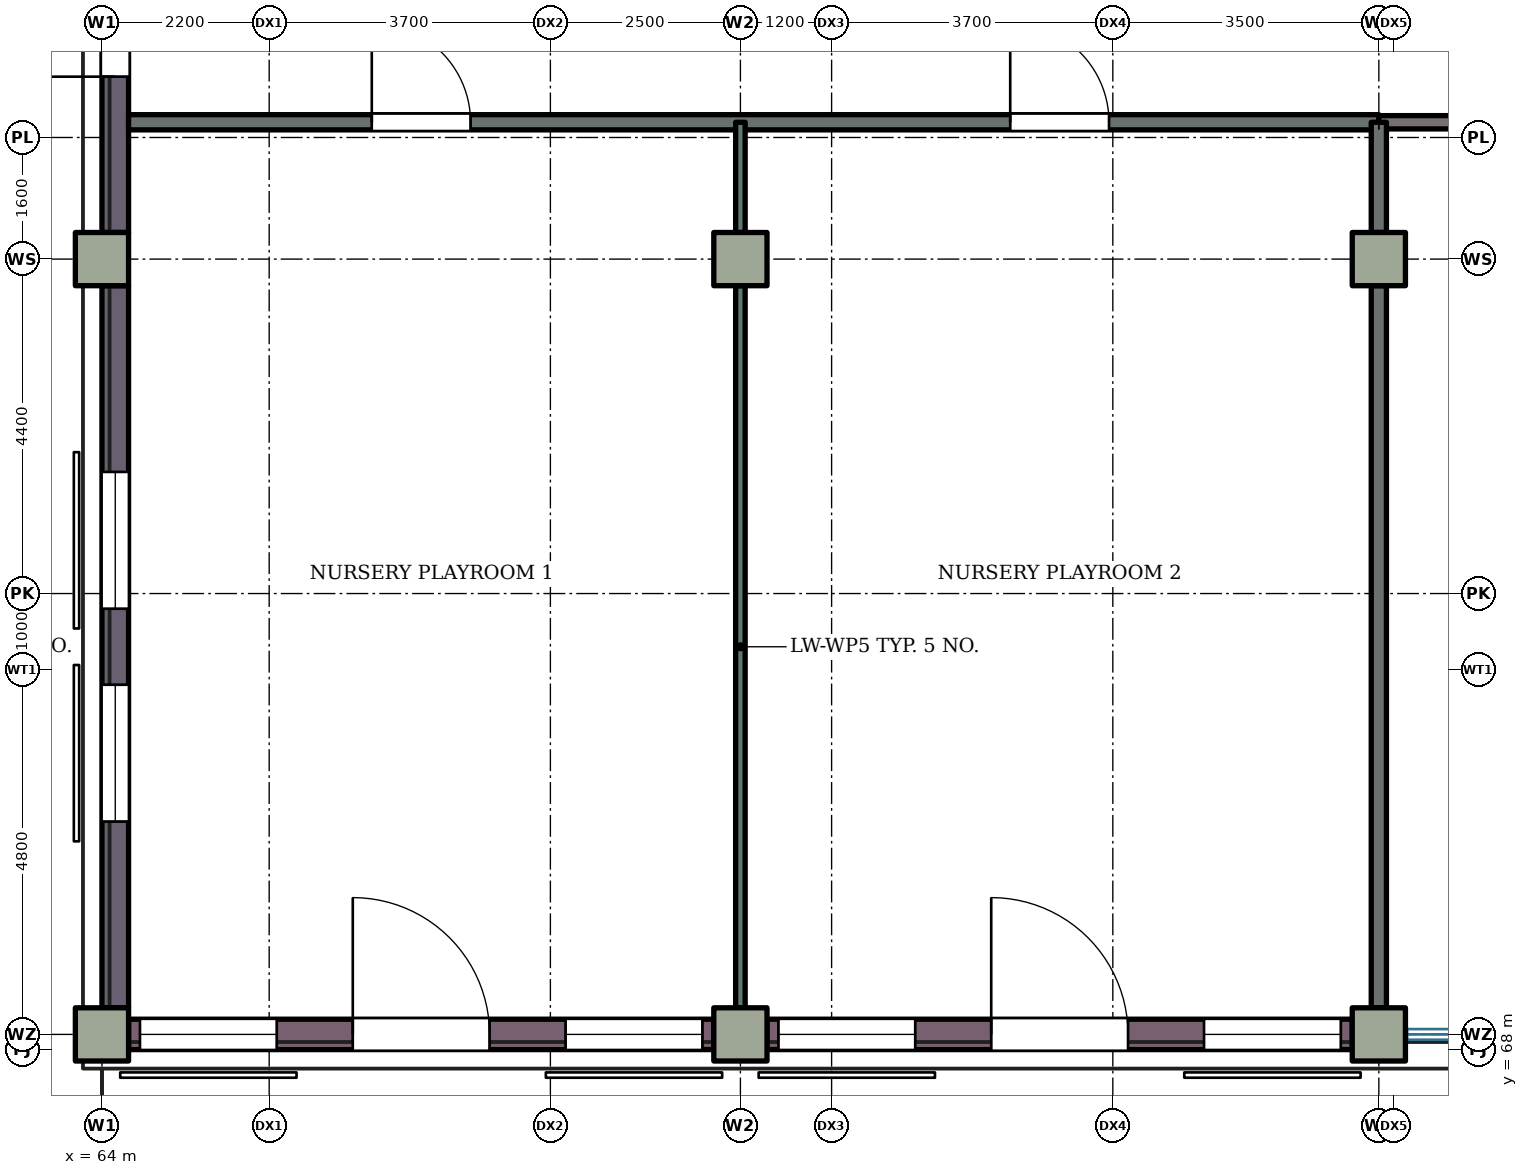
"""IFC4 building model, lengths in metres.
Left out: names, types, materials, properties, quantities, classifications, styles, units other than length and angle.
Written with IfcOpenShell. Run it as: python <this file> out.ifc"""

import sys

from ifc_helpers import new_model, si_unit, direction, frame, frame_2d, origin, origin_2d, place, context, subcontext, project, spatial, rectangle, extrude, element, fill, save


model = new_model("IFC4")
c1 = context("Model", 3, precision=1e-05, world=origin(), true_north=direction((0.0, 1.0)))
c2 = subcontext(c1, "Body", "Model", "MODEL_VIEW")
j1 = project(units=[si_unit("LENGTHUNIT", "METRE"), si_unit("PLANEANGLEUNIT", "RADIAN")], contexts=[c1])
p1 = place(None, origin())
s1 = spatial("IfcSite", under=j1, at=p1, CompositionType="ELEMENT")
p2 = place(p1, origin())
s2 = spatial("IfcBuilding", under=s1, at=p2, CompositionType="ELEMENT")
p3 = place(p2, origin())
s3 = spatial("IfcBuildingStorey", under=s2, at=p3, CompositionType="ELEMENT", Elevation=0.0)
for number, where, z_axis, x_axis in (
    (1, (64.0, 78.4, 0.0), (0.0, 0.0, 1.0), (1.0, 0.0, 0.0)),
    (2, (72.4, 78.4, 0.0), (0.0, 0.0, 1.0), (1.0, 0.0, 0.0)),
    (3, (80.8, 78.4, 0.0), (0.0, 0.0, 1.0), (1.0, 0.0, 0.0)),
    (4, (64.0, 68.2, 0.0), (0.0, 0.0, 1.0), (1.0, 0.0, 0.0)),
    (5, (72.4, 68.2, 0.0), (0.0, 0.0, 1.0), (1.0, 0.0, 0.0)),
    (6, (80.8, 68.2, 0.0), (0.0, 0.0, 1.0), (1.0, 0.0, 0.0)),
):
    element("IfcColumn", number, at=place(p3, frame(where, z_axis=z_axis, x_axis=x_axis)), inside=s3, PredefinedType="COLUMN", context=c2, shape_type="SweptSolid", body=[
        extrude(rectangle(XDim=0.7, YDim=0.7, at=origin_2d()), origin(), (0.0, 0.0, 1.0), 4.2),
    ])
p4 = place(p3, frame((64.175, 68.55, 0.0), z_axis=(0.0, 0.0, 1.0), x_axis=(0.0, 1.0, 0.0)))
e7 = element("IfcWall", 7, at=p4, inside=s3, PredefinedType="SHEAR", context=c2, shape_type="SweptSolid", body=[
    extrude(rectangle(XDim=9.5, YDim=0.35, at=frame_2d((4.75, 0.0))), origin(), (0.0, 0.0, 1.0), 4.2),
])
p5 = place(p4, frame((2.45, 0.0, 0.9)))
e8 = element("IfcOpeningElement", 8, at=p5, cuts=e7, PredefinedType="OPENING", context=c2, shape_type="SweptSolid", body=[
    extrude(rectangle(XDim=1.8, YDim=2.1, at=frame_2d((0.9, 1.05))), frame((0.0, 0.185, 0.0), z_axis=(0.0, -1.0, 0.0), x_axis=(1.0, 0.0, 0.0)), (0.0, 0.0, 1.0), 0.37),
])
p6 = place(p4, frame((5.25, 0.0, 0.9)))
e9 = element("IfcOpeningElement", 9, at=p6, cuts=e7, PredefinedType="OPENING", context=c2, shape_type="SweptSolid", body=[
    extrude(rectangle(XDim=1.8, YDim=2.1, at=frame_2d((0.9, 1.05))), frame((0.0, 0.185, 0.0), z_axis=(0.0, -1.0, 0.0), x_axis=(1.0, 0.0, 0.0)), (0.0, 0.0, 1.0), 0.37),
])
p7 = place(p3, frame((64.175, 78.75, 0.0), z_axis=(0.0, 0.0, 1.0), x_axis=(0.0, 1.0, 0.0)))
e10 = element("IfcWall", 10, at=p7, inside=s3, PredefinedType="SHEAR", context=c2, shape_type="SweptSolid", body=[
    extrude(rectangle(XDim=8.5, YDim=0.35, at=frame_2d((4.25, 0.0))), origin(), (0.0, 0.0, 1.0), 4.2),
])
p8 = place(p7, frame((2.05, 0.0, 0.0)))
e11 = element("IfcOpeningElement", 11, at=p8, cuts=e10, PredefinedType="OPENING", context=c2, shape_type="SweptSolid", body=[
    extrude(rectangle(XDim=1.8, YDim=2.1, at=frame_2d((0.9, 1.05))), frame((0.0, 0.185, 0.0), z_axis=(0.0, -1.0, 0.0), x_axis=(1.0, 0.0, 0.0)), (0.0, 0.0, 1.0), 0.37),
])
p9 = place(p7, frame((6.15, 0.0, 0.0)))
e12 = element("IfcOpeningElement", 12, at=p9, cuts=e10, PredefinedType="OPENING", context=c2, shape_type="SweptSolid", body=[
    extrude(rectangle(XDim=1.8, YDim=2.1, at=frame_2d((0.9, 1.05))), frame((0.0, 0.185, 0.0), z_axis=(0.0, -1.0, 0.0), x_axis=(1.0, 0.0, 0.0)), (0.0, 0.0, 1.0), 0.37),
])
p10 = place(p3, frame((64.35, 68.2, 0.0), z_axis=(0.0, 0.0, 1.0), x_axis=(1.0, 0.0, 0.0)))
e13 = element("IfcWall", 13, at=p10, inside=s3, PredefinedType="SOLIDWALL", context=c2, shape_type="SweptSolid", body=[
    extrude(rectangle(XDim=7.7, YDim=0.4, at=frame_2d((3.85, 0.0))), origin(), (0.0, 0.0, 1.0), 3.32),
])
p11 = place(p10, frame((2.95, 0.0, 0.0)))
e14 = element("IfcOpeningElement", 14, at=p11, cuts=e13, PredefinedType="OPENING", context=c2, shape_type="SweptSolid", body=[
    extrude(rectangle(XDim=1.8, YDim=2.4, at=frame_2d((0.9, 1.2))), frame((0.0, 0.21, 0.0), z_axis=(0.0, -1.0, 0.0), x_axis=(1.0, 0.0, 0.0)), (0.0, 0.0, 1.0), 0.42),
])
p12 = place(p10, frame((0.15, 0.0, 0.9)))
e15 = element("IfcOpeningElement", 15, at=p12, cuts=e13, PredefinedType="OPENING", context=c2, shape_type="SweptSolid", body=[
    extrude(rectangle(XDim=1.8, YDim=1.9, at=frame_2d((0.9, 0.95))), frame((0.0, 0.21, 0.0), z_axis=(0.0, -1.0, 0.0), x_axis=(1.0, 0.0, 0.0)), (0.0, 0.0, 1.0), 0.42),
])
p13 = place(p10, frame((5.75, 0.0, 0.9)))
e16 = element("IfcOpeningElement", 16, at=p13, cuts=e13, PredefinedType="OPENING", context=c2, shape_type="SweptSolid", body=[
    extrude(rectangle(XDim=1.8, YDim=1.9, at=frame_2d((0.9, 0.95))), frame((0.0, 0.21, 0.0), z_axis=(0.0, -1.0, 0.0), x_axis=(1.0, 0.0, 0.0)), (0.0, 0.0, 1.0), 0.42),
])
p14 = place(p3, frame((72.75, 68.2, 0.0), z_axis=(0.0, 0.0, 1.0), x_axis=(1.0, 0.0, 0.0)))
e17 = element("IfcWall", 17, at=p14, inside=s3, PredefinedType="SOLIDWALL", context=c2, shape_type="SweptSolid", body=[
    extrude(rectangle(XDim=7.7, YDim=0.4, at=frame_2d((3.85, 0.0))), origin(), (0.0, 0.0, 1.0), 3.32),
])
p15 = place(p14, frame((2.95, 0.0, 0.0)))
e18 = element("IfcOpeningElement", 18, at=p15, cuts=e17, PredefinedType="OPENING", context=c2, shape_type="SweptSolid", body=[
    extrude(rectangle(XDim=1.8, YDim=2.4, at=frame_2d((0.9, 1.2))), frame((0.0, 0.21, 0.0), z_axis=(0.0, -1.0, 0.0), x_axis=(1.0, 0.0, 0.0)), (0.0, 0.0, 1.0), 0.42),
])
p16 = place(p14, frame((0.15, 0.0, 0.9)))
e19 = element("IfcOpeningElement", 19, at=p16, cuts=e17, PredefinedType="OPENING", context=c2, shape_type="SweptSolid", body=[
    extrude(rectangle(XDim=1.8, YDim=1.9, at=frame_2d((0.9, 0.95))), frame((0.0, 0.21, 0.0), z_axis=(0.0, -1.0, 0.0), x_axis=(1.0, 0.0, 0.0)), (0.0, 0.0, 1.0), 0.42),
])
p17 = place(p14, frame((5.75, 0.0, 0.9)))
e20 = element("IfcOpeningElement", 20, at=p17, cuts=e17, PredefinedType="OPENING", context=c2, shape_type="SweptSolid", body=[
    extrude(rectangle(XDim=1.8, YDim=1.9, at=frame_2d((0.9, 0.95))), frame((0.0, 0.21, 0.0), z_axis=(0.0, -1.0, 0.0), x_axis=(1.0, 0.0, 0.0)), (0.0, 0.0, 1.0), 0.42),
])
p18 = place(p3, frame((64.35, 80.2, 0.0), z_axis=(0.0, 0.0, 1.0), x_axis=(1.0, 0.0, 0.0)))
e21 = element("IfcWall", 21, at=p18, inside=s3, PredefinedType="PARTITIONING", context=c2, shape_type="SweptSolid", body=[
    extrude(rectangle(XDim=16.45, YDim=0.2, at=frame_2d((8.225, 0.0))), origin(), (0.0, 0.0, 1.0), 3.92),
])
p19 = place(p18, frame((3.2, 0.0, 0.0)))
e22 = element("IfcOpeningElement", 22, at=p19, cuts=e21, PredefinedType="OPENING", context=c2, shape_type="SweptSolid", body=[
    extrude(rectangle(XDim=1.3, YDim=2.1, at=frame_2d((0.65, 1.05))), frame((0.0, 0.11, 0.0), z_axis=(0.0, -1.0, 0.0), x_axis=(1.0, 0.0, 0.0)), (0.0, 0.0, 1.0), 0.22),
])
p20 = place(p18, frame((11.6, 0.0, 0.0)))
e23 = element("IfcOpeningElement", 23, at=p20, cuts=e21, PredefinedType="OPENING", context=c2, shape_type="SweptSolid", body=[
    extrude(rectangle(XDim=1.3, YDim=2.1, at=frame_2d((0.65, 1.05))), frame((0.0, 0.11, 0.0), z_axis=(0.0, -1.0, 0.0), x_axis=(1.0, 0.0, 0.0)), (0.0, 0.0, 1.0), 0.22),
])
p21 = place(p3, frame((80.8, 80.2, 0.0), z_axis=(0.0, 0.0, 1.0), x_axis=(1.0, 0.0, 0.0)))
e24 = element("IfcWall", 24, at=p21, inside=s3, PredefinedType="PARTITIONING", context=c2, shape_type="SweptSolid", body=[
    extrude(rectangle(XDim=25.2, YDim=0.175, at=frame_2d((12.6, 0.0))), origin(), (0.0, 0.0, 1.0), 3.92),
])
p22 = place(p21, frame((11.9, 0.0, 0.0)))
e25 = element("IfcOpeningElement", 25, at=p22, cuts=e24, PredefinedType="OPENING", context=c2, shape_type="SweptSolid", body=[
    extrude(rectangle(XDim=1.4, YDim=2.1, at=frame_2d((0.7, 1.05))), frame((0.0, 0.097, 0.0), z_axis=(0.0, -1.0, 0.0), x_axis=(1.0, 0.0, 0.0)), (0.0, 0.0, 1.0), 0.195),
])
p23 = place(p3, frame((72.4, 68.55, 0.0), z_axis=(0.0, 0.0, 1.0), x_axis=(0.0, 1.0, 0.0)))
e26 = element("IfcWall", 26, at=p23, inside=s3, PredefinedType="PARTITIONING", context=c2, shape_type="SweptSolid", body=[
    extrude(rectangle(XDim=9.5, YDim=0.125, at=frame_2d((4.75, 0.0))), origin(), (0.0, 0.0, 1.0), 3.02),
])
p24 = place(p3, frame((72.4, 78.75, 0.0), z_axis=(0.0, 0.0, 1.0), x_axis=(0.0, 1.0, 0.0)))
e27 = element("IfcWall", 27, at=p24, inside=s3, PredefinedType="PARTITIONING", context=c2, shape_type="SweptSolid", body=[
    extrude(rectangle(XDim=1.45, YDim=0.125, at=frame_2d((0.725, 0.0))), origin(), (0.0, 0.0, 1.0), 3.02),
])
p25 = place(p3, frame((80.8, 68.55, 0.0), z_axis=(0.0, 0.0, 1.0), x_axis=(0.0, 1.0, 0.0)))
e28 = element("IfcWall", 28, at=p25, inside=s3, PredefinedType="PARTITIONING", context=c2, shape_type="SweptSolid", body=[
    extrude(rectangle(XDim=9.5, YDim=0.2, at=frame_2d((4.75, 0.0))), origin(), (0.0, 0.0, 1.0), 3.02),
])
p26 = place(p3, frame((80.8, 78.75, 0.0), z_axis=(0.0, 0.0, 1.0), x_axis=(0.0, 1.0, 0.0)))
e29 = element("IfcWall", 29, at=p26, inside=s3, PredefinedType="PARTITIONING", context=c2, shape_type="SweptSolid", body=[
    extrude(rectangle(XDim=1.45, YDim=0.2, at=frame_2d((0.725, 0.0))), origin(), (0.0, 0.0, 1.0), 3.02),
])
p27 = place(p11, origin())
e30 = element("IfcDoor", 30, at=p27, inside=s3, OperationType="DOUBLE_DOOR_SINGLE_SWING", PredefinedType="DOOR", context=c2, shape_type="SweptSolid", body=[
    extrude(rectangle(XDim=1.8, YDim=2.4, at=frame_2d((0.9, 1.2))), frame((0.0, 0.025, 0.0), z_axis=(0.0, -1.0, 0.0), x_axis=(1.0, 0.0, 0.0)), (0.0, 0.0, 1.0), 0.05),
])
fill(e14, e30)
p28 = place(p12, origin())
e31 = element("IfcWindow", 31, at=p28, inside=s3, PartitioningType="SINGLE_PANEL", PredefinedType="WINDOW", context=c2, shape_type="SweptSolid", body=[
    extrude(rectangle(XDim=1.8, YDim=1.9, at=frame_2d((0.9, 0.95))), frame((0.0, 0.03, 0.0), z_axis=(0.0, -1.0, 0.0), x_axis=(1.0, 0.0, 0.0)), (0.0, 0.0, 1.0), 0.06),
])
fill(e15, e31)
p29 = place(p13, origin())
e32 = element("IfcWindow", 32, at=p29, inside=s3, PartitioningType="SINGLE_PANEL", PredefinedType="WINDOW", context=c2, shape_type="SweptSolid", body=[
    extrude(rectangle(XDim=1.8, YDim=1.9, at=frame_2d((0.9, 0.95))), frame((0.0, 0.03, 0.0), z_axis=(0.0, -1.0, 0.0), x_axis=(1.0, 0.0, 0.0)), (0.0, 0.0, 1.0), 0.06),
])
fill(e16, e32)
p30 = place(p15, origin())
e33 = element("IfcDoor", 33, at=p30, inside=s3, OperationType="DOUBLE_DOOR_SINGLE_SWING", PredefinedType="DOOR", context=c2, shape_type="SweptSolid", body=[
    extrude(rectangle(XDim=1.8, YDim=2.4, at=frame_2d((0.9, 1.2))), frame((0.0, 0.025, 0.0), z_axis=(0.0, -1.0, 0.0), x_axis=(1.0, 0.0, 0.0)), (0.0, 0.0, 1.0), 0.05),
])
fill(e18, e33)
p31 = place(p16, origin())
e34 = element("IfcWindow", 34, at=p31, inside=s3, PartitioningType="SINGLE_PANEL", PredefinedType="WINDOW", context=c2, shape_type="SweptSolid", body=[
    extrude(rectangle(XDim=1.8, YDim=1.9, at=frame_2d((0.9, 0.95))), frame((0.0, 0.03, 0.0), z_axis=(0.0, -1.0, 0.0), x_axis=(1.0, 0.0, 0.0)), (0.0, 0.0, 1.0), 0.06),
])
fill(e19, e34)
p32 = place(p17, origin())
e35 = element("IfcWindow", 35, at=p32, inside=s3, PartitioningType="SINGLE_PANEL", PredefinedType="WINDOW", context=c2, shape_type="SweptSolid", body=[
    extrude(rectangle(XDim=1.8, YDim=1.9, at=frame_2d((0.9, 0.95))), frame((0.0, 0.03, 0.0), z_axis=(0.0, -1.0, 0.0), x_axis=(1.0, 0.0, 0.0)), (0.0, 0.0, 1.0), 0.06),
])
fill(e20, e35)
p33 = place(p8, origin())
e36 = element("IfcDoor", 36, at=p33, inside=s3, OperationType="DOUBLE_DOOR_SINGLE_SWING", PredefinedType="DOOR", context=c2, shape_type="SweptSolid", body=[
    extrude(rectangle(XDim=1.8, YDim=2.1, at=frame_2d((0.9, 1.05))), frame((0.0, 0.025, 0.0), z_axis=(0.0, -1.0, 0.0), x_axis=(1.0, 0.0, 0.0)), (0.0, 0.0, 1.0), 0.05),
])
fill(e11, e36)
p34 = place(p5, origin())
e37 = element("IfcWindow", 37, at=p34, inside=s3, PartitioningType="SINGLE_PANEL", PredefinedType="WINDOW", context=c2, shape_type="SweptSolid", body=[
    extrude(rectangle(XDim=1.8, YDim=2.1, at=frame_2d((0.9, 1.05))), frame((0.0, 0.03, 0.0), z_axis=(0.0, -1.0, 0.0), x_axis=(1.0, 0.0, 0.0)), (0.0, 0.0, 1.0), 0.06),
])
fill(e8, e37)
p35 = place(p6, origin())
e38 = element("IfcWindow", 38, at=p35, inside=s3, PartitioningType="SINGLE_PANEL", PredefinedType="WINDOW", context=c2, shape_type="SweptSolid", body=[
    extrude(rectangle(XDim=1.8, YDim=2.1, at=frame_2d((0.9, 1.05))), frame((0.0, 0.03, 0.0), z_axis=(0.0, -1.0, 0.0), x_axis=(1.0, 0.0, 0.0)), (0.0, 0.0, 1.0), 0.06),
])
fill(e9, e38)
p36 = place(p19, origin())
e39 = element("IfcDoor", 39, at=p36, inside=s3, OperationType="DOUBLE_DOOR_SINGLE_SWING", PredefinedType="DOOR", context=c2, shape_type="SweptSolid", body=[
    extrude(rectangle(XDim=1.3, YDim=2.1, at=frame_2d((0.65, 1.05))), frame((0.0, 0.025, 0.0), z_axis=(0.0, -1.0, 0.0), x_axis=(1.0, 0.0, 0.0)), (0.0, 0.0, 1.0), 0.05),
])
fill(e22, e39)
p37 = place(p20, origin())
e40 = element("IfcDoor", 40, at=p37, inside=s3, OperationType="DOUBLE_DOOR_SINGLE_SWING", PredefinedType="DOOR", context=c2, shape_type="SweptSolid", body=[
    extrude(rectangle(XDim=1.3, YDim=2.1, at=frame_2d((0.65, 1.05))), frame((0.0, 0.025, 0.0), z_axis=(0.0, -1.0, 0.0), x_axis=(1.0, 0.0, 0.0)), (0.0, 0.0, 1.0), 0.05),
])
fill(e23, e40)
save(model, sys.argv[1])
